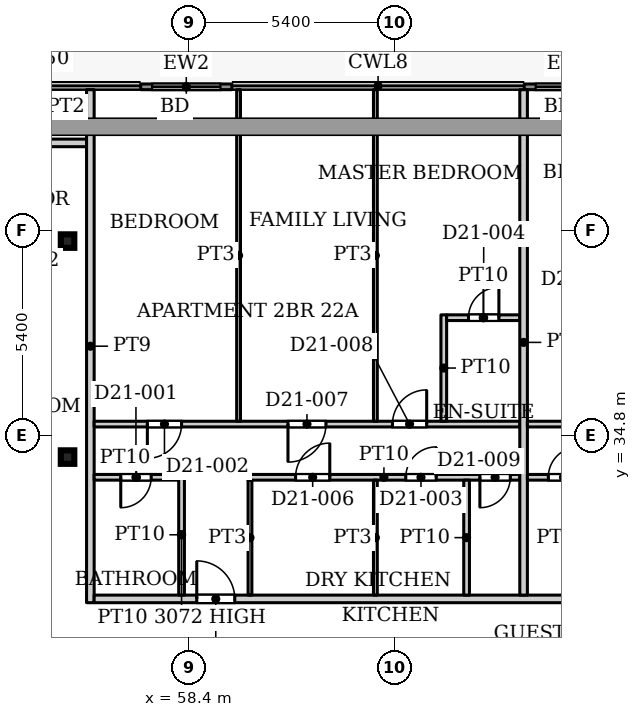
"""IFC4 building model, lengths in metres.
Left out: names, types, materials, properties, quantities, classifications, styles, units other than length and angle.
Written with IfcOpenShell. Run it as: python <this file> out.ifc"""

import sys

from ifc_helpers import new_model, si_unit, direction, frame, frame_2d, origin, origin_2d, place, context, subcontext, project, spatial, rectangle, hollow_rectangle, extrude, source, transform, mapped, element, fill, save


model = new_model("IFC4")
c1 = context("Model", 3, precision=1e-05, world=origin(), true_north=direction((0.0, 1.0)))
c2 = subcontext(c1, "Body", "Model", "MODEL_VIEW")
j1 = project(units=[si_unit("LENGTHUNIT", "METRE"), si_unit("PLANEANGLEUNIT", "RADIAN")], contexts=[c1])
p1 = place(None, origin())
s1 = spatial("IfcSite", under=j1, at=p1, CompositionType="ELEMENT")
p2 = place(p1, origin())
s2 = spatial("IfcBuilding", under=s1, at=p2, CompositionType="ELEMENT")
p3 = place(p2, frame((0.0, 0.0, 98.0)))
s3 = spatial("IfcBuildingStorey", under=s2, at=p3, CompositionType="ELEMENT", Elevation=98.0)
for number, where, z_axis, x_axis in (
    (1, (55.2, 34.232, 0.0), (0.0, 0.0, 1.0), (1.0, 0.0, 0.0)),
    (2, (55.2, 39.916, 0.0), (0.0, 0.0, 1.0), (1.0, 0.0, 0.0)),
):
    element("IfcColumn", number, at=place(p3, frame(where, z_axis=z_axis, x_axis=x_axis)), inside=s3, PredefinedType="COLUMN", context=c2, shape_type="SweptSolid", body=[
        extrude(hollow_rectangle(XDim=0.356, YDim=0.356, WallThickness=0.016, InnerFilletRadius=0.016, OuterFilletRadius=0.032, at=origin_2d()), origin(), (0.0, 0.0, 1.0), 3.9),
    ])
p4 = place(p3, frame((57.124, 43.975, 0.0), z_axis=(0.0, 0.0, 1.0), x_axis=(1.0, 0.0, 0.0)))
e3 = element("IfcWall", 3, at=p4, inside=s3, PredefinedType="SOLIDWALL", context=c2, shape_type="SweptSolid", body=[
    extrude(rectangle(XDim=2.4, YDim=0.15, at=frame_2d((1.2, 0.0))), origin(), (0.0, 0.0, 1.0), 3.75),
])
p5 = place(p4, frame((0.3, 0.0, 0.0)))
e4 = element("IfcOpeningElement", 4, at=p5, cuts=e3, PredefinedType="OPENING", context=c2, shape_type="SweptSolid", body=[
    extrude(rectangle(XDim=1.8, YDim=2.4, at=frame_2d((0.9, 1.2))), frame((0.0, 0.085, 0.0), z_axis=(0.0, -1.0, 0.0), x_axis=(1.0, 0.0, 0.0)), (0.0, 0.0, 1.0), 0.17),
])
p6 = place(p3, frame((67.218, 43.975, 0.0), z_axis=(0.0, 0.0, 1.0), x_axis=(1.0, 0.0, 0.0)))
e5 = element("IfcWall", 5, at=p6, inside=s3, PredefinedType="SOLIDWALL", context=c2, shape_type="SweptSolid", body=[
    extrude(rectangle(XDim=2.4, YDim=0.15, at=frame_2d((1.2, 0.0))), origin(), (0.0, 0.0, 1.0), 3.75),
])
p7 = place(p6, frame((0.3, 0.0, 0.0)))
e6 = element("IfcOpeningElement", 6, at=p7, cuts=e5, PredefinedType="OPENING", context=c2, shape_type="SweptSolid", body=[
    extrude(rectangle(XDim=1.8, YDim=2.4, at=frame_2d((0.9, 1.2))), frame((0.0, 0.085, 0.0), z_axis=(0.0, -1.0, 0.0), x_axis=(1.0, 0.0, 0.0)), (0.0, 0.0, 1.0), 0.17),
])
p8 = place(p3, frame((53.5, 42.5, 0.0), z_axis=(0.0, 0.0, 1.0), x_axis=(1.0, 0.0, 0.0)))
e7 = element("IfcWall", 7, at=p8, inside=s3, PredefinedType="PARTITIONING", context=c2, shape_type="SweptSolid", body=[
    extrude(rectangle(XDim=2.2, YDim=0.2, at=frame_2d((1.1, 0.0))), origin(), (0.0, 0.0, 1.0), 3.6),
])
p9 = place(p8, frame((0.15, 0.0, 0.0)))
e8 = element("IfcOpeningElement", 8, at=p9, cuts=e7, PredefinedType="OPENING", context=c2, shape_type="SweptSolid", body=[
    extrude(rectangle(XDim=1.0, YDim=2.1, at=frame_2d((0.5, 1.05))), frame((0.0, 0.11, 0.0), z_axis=(0.0, -1.0, 0.0), x_axis=(1.0, 0.0, 0.0)), (0.0, 0.0, 1.0), 0.22),
])
p10 = place(p3, frame((55.8, 30.4, 0.0), z_axis=(0.0, 0.0, 1.0), x_axis=(0.0, 1.0, 0.0)))
e9 = element("IfcWall", 9, at=p10, inside=s3, PredefinedType="PARTITIONING", context=c2, shape_type="SweptSolid", body=[
    extrude(rectangle(XDim=13.5, YDim=0.2, at=frame_2d((6.75, 0.0))), origin(), (0.0, 0.0, 1.0), 3.6),
])
p11 = place(p3, frame((55.9, 30.5, 0.0), z_axis=(0.0, 0.0, 1.0), x_axis=(1.0, 0.0, 0.0)))
e10 = element("IfcWall", 10, at=p11, inside=s3, PredefinedType="PARTITIONING", context=c2, shape_type="SweptSolid", body=[
    extrude(rectangle(XDim=42.2, YDim=0.2, at=frame_2d((21.1, 0.0))), origin(), (0.0, 0.0, 1.0), 3.6),
])
p12 = place(p11, frame((2.7, 0.0, 0.0)))
e11 = element("IfcOpeningElement", 11, at=p12, cuts=e10, PredefinedType="OPENING", context=c2, shape_type="SweptSolid", body=[
    extrude(rectangle(XDim=1.0, YDim=2.1, at=frame_2d((0.5, 1.05))), frame((0.0, 0.11, 0.0), z_axis=(0.0, -1.0, 0.0), x_axis=(1.0, 0.0, 0.0)), (0.0, 0.0, 1.0), 0.22),
])
p13 = place(p11, frame((15.3, 0.0, 0.0)))
e12 = element("IfcOpeningElement", 12, at=p13, cuts=e10, PredefinedType="OPENING", context=c2, shape_type="SweptSolid", body=[
    extrude(rectangle(XDim=1.0, YDim=2.1, at=frame_2d((0.5, 1.05))), frame((0.0, 0.11, 0.0), z_axis=(0.0, -1.0, 0.0), x_axis=(1.0, 0.0, 0.0)), (0.0, 0.0, 1.0), 0.22),
])
p14 = place(p11, frame((33.3, 0.0, 0.0)))
e13 = element("IfcOpeningElement", 13, at=p14, cuts=e10, PredefinedType="OPENING", context=c2, shape_type="SweptSolid", body=[
    extrude(rectangle(XDim=1.0, YDim=2.1, at=frame_2d((0.5, 1.05))), frame((0.0, 0.11, 0.0), z_axis=(0.0, -1.0, 0.0), x_axis=(1.0, 0.0, 0.0)), (0.0, 0.0, 1.0), 0.22),
])
p15 = place(p3, frame((55.9, 33.7, 0.0), z_axis=(0.0, 0.0, 1.0), x_axis=(1.0, 0.0, 0.0)))
e14 = element("IfcWall", 14, at=p15, inside=s3, PredefinedType="PARTITIONING", context=c2, shape_type="SweptSolid", body=[
    extrude(rectangle(XDim=2.225, YDim=0.15, at=frame_2d((1.113, 0.0))), origin(), (0.0, 0.0, 1.0), 3.6),
])
p16 = place(p15, frame((0.7, 0.0, 0.0)))
e15 = element("IfcOpeningElement", 15, at=p16, cuts=e14, PredefinedType="OPENING", context=c2, shape_type="SweptSolid", body=[
    extrude(rectangle(XDim=0.8, YDim=2.1, at=frame_2d((0.4, 1.05))), frame((0.0, 0.085, 0.0), z_axis=(0.0, -1.0, 0.0), x_axis=(1.0, 0.0, 0.0)), (0.0, 0.0, 1.0), 0.17),
])
p17 = place(p3, frame((55.9, 35.1, 0.0), z_axis=(0.0, 0.0, 1.0), x_axis=(1.0, 0.0, 0.0)))
e16 = element("IfcWall", 16, at=p17, inside=s3, PredefinedType="PARTITIONING", context=c2, shape_type="SweptSolid", body=[
    extrude(rectangle(XDim=11.2, YDim=0.15, at=frame_2d((5.6, 0.0))), origin(), (0.0, 0.0, 1.0), 3.6),
])
p18 = place(p17, frame((1.4, 0.0, 0.0)))
e17 = element("IfcOpeningElement", 17, at=p18, cuts=e16, PredefinedType="OPENING", context=c2, shape_type="SweptSolid", body=[
    extrude(rectangle(XDim=0.9, YDim=2.1, at=frame_2d((0.45, 1.05))), frame((0.0, 0.085, 0.0), z_axis=(0.0, -1.0, 0.0), x_axis=(1.0, 0.0, 0.0)), (0.0, 0.0, 1.0), 0.17),
])
p19 = place(p17, frame((5.1, 0.0, 0.0)))
e18 = element("IfcOpeningElement", 18, at=p19, cuts=e16, PredefinedType="OPENING", context=c2, shape_type="SweptSolid", body=[
    extrude(rectangle(XDim=1.0, YDim=2.1, at=frame_2d((0.5, 1.05))), frame((0.0, 0.085, 0.0), z_axis=(0.0, -1.0, 0.0), x_axis=(1.0, 0.0, 0.0)), (0.0, 0.0, 1.0), 0.17),
])
p20 = place(p17, frame((7.85, 0.0, 0.0)))
e19 = element("IfcOpeningElement", 19, at=p20, cuts=e16, PredefinedType="OPENING", context=c2, shape_type="SweptSolid", body=[
    extrude(rectangle(XDim=0.9, YDim=2.1, at=frame_2d((0.45, 1.05))), frame((0.0, 0.085, 0.0), z_axis=(0.0, -1.0, 0.0), x_axis=(1.0, 0.0, 0.0)), (0.0, 0.0, 1.0), 0.17),
])
p21 = place(p3, frame((58.2, 30.6, 0.0), z_axis=(0.0, 0.0, 1.0), x_axis=(0.0, 1.0, 0.0)))
e20 = element("IfcWall", 20, at=p21, inside=s3, PredefinedType="PARTITIONING", context=c2, shape_type="SweptSolid", body=[
    extrude(rectangle(XDim=3.175, YDim=0.15, at=frame_2d((1.587, 0.0))), origin(), (0.0, 0.0, 1.0), 3.072),
])
p22 = place(p3, frame((59.7, 35.175, 0.0), z_axis=(0.0, 0.0, 1.0), x_axis=(0.0, 1.0, 0.0)))
e21 = element("IfcWall", 21, at=p22, inside=s3, PredefinedType="PARTITIONING", context=c2, shape_type="SweptSolid", body=[
    extrude(rectangle(XDim=8.725, YDim=0.1, at=frame_2d((4.362, 0.0))), origin(), (0.0, 0.0, 1.0), 3.6),
])
p23 = place(p3, frame((59.95, 33.7, 0.0), z_axis=(0.0, 0.0, 1.0), x_axis=(1.0, 0.0, 0.0)))
e22 = element("IfcWall", 22, at=p23, inside=s3, PredefinedType="PARTITIONING", context=c2, shape_type="SweptSolid", body=[
    extrude(rectangle(XDim=7.15, YDim=0.15, at=frame_2d((3.575, 0.0))), origin(), (0.0, 0.0, 1.0), 3.6),
])
p24 = place(p23, frame((4.15, 0.0, 0.0)))
e23 = element("IfcOpeningElement", 23, at=p24, cuts=e22, PredefinedType="OPENING", context=c2, shape_type="SweptSolid", body=[
    extrude(rectangle(XDim=0.8, YDim=2.1, at=frame_2d((0.4, 1.05))), frame((0.0, 0.085, 0.0), z_axis=(0.0, -1.0, 0.0), x_axis=(1.0, 0.0, 0.0)), (0.0, 0.0, 1.0), 0.17),
])
p25 = place(p23, frame((1.25, 0.0, 0.0)))
e24 = element("IfcOpeningElement", 24, at=p25, cuts=e22, PredefinedType="OPENING", context=c2, shape_type="SweptSolid", body=[
    extrude(rectangle(XDim=0.9, YDim=2.1, at=frame_2d((0.45, 1.05))), frame((0.0, 0.085, 0.0), z_axis=(0.0, -1.0, 0.0), x_axis=(1.0, 0.0, 0.0)), (0.0, 0.0, 1.0), 0.17),
])
p26 = place(p23, frame((6.1, 0.0, 0.0)))
e25 = element("IfcOpeningElement", 25, at=p26, cuts=e22, PredefinedType="OPENING", context=c2, shape_type="SweptSolid", body=[
    extrude(rectangle(XDim=0.8, YDim=2.1, at=frame_2d((0.4, 1.05))), frame((0.0, 0.085, 0.0), z_axis=(0.0, -1.0, 0.0), x_axis=(1.0, 0.0, 0.0)), (0.0, 0.0, 1.0), 0.17),
])
for number, where, z_axis, x_axis in (
    (26, (60.0, 30.6, 0.0), (0.0, 0.0, 1.0), (0.0, 1.0, 0.0)),
    (27, (63.3, 30.6, 0.0), (0.0, 0.0, 1.0), (0.0, 1.0, 0.0)),
):
    element("IfcWall", number, at=place(p3, frame(where, z_axis=z_axis, x_axis=x_axis)), inside=s3, PredefinedType="PARTITIONING", context=c2, shape_type="SweptSolid", body=[
        extrude(rectangle(XDim=3.025, YDim=0.1, at=frame_2d((1.512, 0.0))), origin(), (0.0, 0.0, 1.0), 3.6),
    ])
p27 = place(p3, frame((63.3, 35.175, 0.0), z_axis=(0.0, 0.0, 1.0), x_axis=(0.0, 1.0, 0.0)))
e28 = element("IfcWall", 28, at=p27, inside=s3, PredefinedType="PARTITIONING", context=c2, shape_type="SweptSolid", body=[
    extrude(rectangle(XDim=8.725, YDim=0.1, at=frame_2d((4.362, 0.0))), origin(), (0.0, 0.0, 1.0), 3.6),
])
p28 = place(p3, frame((65.1, 35.175, 0.0), z_axis=(0.0, 0.0, 1.0), x_axis=(0.0, 1.0, 0.0)))
e29 = element("IfcWall", 29, at=p28, inside=s3, PredefinedType="PARTITIONING", context=c2, shape_type="SweptSolid", body=[
    extrude(rectangle(XDim=2.8, YDim=0.15, at=frame_2d((1.4, 0.0))), origin(), (0.0, 0.0, 1.0), 3.6),
])
p29 = place(p3, frame((65.175, 37.9, 0.0), z_axis=(0.0, 0.0, 1.0), x_axis=(1.0, 0.0, 0.0)))
e30 = element("IfcWall", 30, at=p29, inside=s3, PredefinedType="PARTITIONING", context=c2, shape_type="SweptSolid", body=[
    extrude(rectangle(XDim=1.925, YDim=0.15, at=frame_2d((0.962, 0.0))), origin(), (0.0, 0.0, 1.0), 3.6),
])
p30 = place(p29, frame((0.575, 0.0, 0.0)))
e31 = element("IfcOpeningElement", 31, at=p30, cuts=e30, PredefinedType="OPENING", context=c2, shape_type="SweptSolid", body=[
    extrude(rectangle(XDim=0.8, YDim=2.1, at=frame_2d((0.4, 1.05))), frame((0.0, 0.085, 0.0), z_axis=(0.0, -1.0, 0.0), x_axis=(1.0, 0.0, 0.0)), (0.0, 0.0, 1.0), 0.17),
])
p31 = place(p3, frame((65.7, 30.6, 0.0), z_axis=(0.0, 0.0, 1.0), x_axis=(0.0, 1.0, 0.0)))
e32 = element("IfcWall", 32, at=p31, inside=s3, PredefinedType="PARTITIONING", context=c2, shape_type="SweptSolid", body=[
    extrude(rectangle(XDim=3.025, YDim=0.15, at=frame_2d((1.512, 0.0))), origin(), (0.0, 0.0, 1.0), 3.6),
])
p32 = place(p3, frame((67.2, 30.6, 0.0), z_axis=(0.0, 0.0, 1.0), x_axis=(0.0, 1.0, 0.0)))
e33 = element("IfcWall", 33, at=p32, inside=s3, PredefinedType="PARTITIONING", context=c2, shape_type="SweptSolid", body=[
    extrude(rectangle(XDim=13.3, YDim=0.2, at=frame_2d((6.65, 0.0))), origin(), (0.0, 0.0, 1.0), 3.6),
])
p33 = place(p3, frame((67.3, 33.7, 0.0), z_axis=(0.0, 0.0, 1.0), x_axis=(1.0, 0.0, 0.0)))
e34 = element("IfcWall", 34, at=p33, inside=s3, PredefinedType="PARTITIONING", context=c2, shape_type="SweptSolid", body=[
    extrude(rectangle(XDim=3.55, YDim=0.15, at=frame_2d((1.775, 0.0))), origin(), (0.0, 0.0, 1.0), 3.6),
])
p34 = place(p33, frame((0.55, 0.0, 0.0)))
e35 = element("IfcOpeningElement", 35, at=p34, cuts=e34, PredefinedType="OPENING", context=c2, shape_type="SweptSolid", body=[
    extrude(rectangle(XDim=0.8, YDim=2.1, at=frame_2d((0.4, 1.05))), frame((0.0, 0.085, 0.0), z_axis=(0.0, -1.0, 0.0), x_axis=(1.0, 0.0, 0.0)), (0.0, 0.0, 1.0), 0.17),
])
p35 = place(p33, frame((2.35, 0.0, 0.0)))
e36 = element("IfcOpeningElement", 36, at=p35, cuts=e34, PredefinedType="OPENING", context=c2, shape_type="SweptSolid", body=[
    extrude(rectangle(XDim=0.8, YDim=2.1, at=frame_2d((0.4, 1.05))), frame((0.0, 0.085, 0.0), z_axis=(0.0, -1.0, 0.0), x_axis=(1.0, 0.0, 0.0)), (0.0, 0.0, 1.0), 0.17),
])
p36 = place(p3, frame((67.3, 35.1, 0.0), z_axis=(0.0, 0.0, 1.0), x_axis=(1.0, 0.0, 0.0)))
e37 = element("IfcWall", 37, at=p36, inside=s3, PredefinedType="PARTITIONING", context=c2, shape_type="SweptSolid", body=[
    extrude(rectangle(XDim=9.7, YDim=0.15, at=frame_2d((4.85, 0.0))), origin(), (0.0, 0.0, 1.0), 3.6),
])
p37 = place(p36, frame((1.0, 0.0, 0.0)))
e38 = element("IfcOpeningElement", 38, at=p37, cuts=e37, PredefinedType="OPENING", context=c2, shape_type="SweptSolid", body=[
    extrude(rectangle(XDim=0.9, YDim=2.1, at=frame_2d((0.45, 1.05))), frame((0.0, 0.085, 0.0), z_axis=(0.0, -1.0, 0.0), x_axis=(1.0, 0.0, 0.0)), (0.0, 0.0, 1.0), 0.17),
])
p38 = place(p36, frame((6.3, 0.0, 0.0)))
e39 = element("IfcOpeningElement", 39, at=p38, cuts=e37, PredefinedType="OPENING", context=c2, shape_type="SweptSolid", body=[
    extrude(rectangle(XDim=1.0, YDim=2.1, at=frame_2d((0.5, 1.05))), frame((0.0, 0.085, 0.0), z_axis=(0.0, -1.0, 0.0), x_axis=(1.0, 0.0, 0.0)), (0.0, 0.0, 1.0), 0.17),
])
m1 = source(origin(), c2, "Body", "SweptSolid", [
    extrude(rectangle(XDim=1.8, YDim=2.4, at=frame_2d((0.9, 1.2))), frame((0.0, 0.025, 0.0), z_axis=(0.0, -1.0, 0.0), x_axis=(1.0, 0.0, 0.0)), (0.0, 0.0, 1.0), 0.05),
])
p39 = place(p5, origin())
e40 = element("IfcDoor", 40, at=p39, inside=s3, OperationType="SLIDING_TO_LEFT", PredefinedType="DOOR", context=c2, shape_type="MappedRepresentation", body=[
    mapped(m1, transform((0.0, 0.0, 0.0), x_axis=(1.0, 0.0, 0.0), y_axis=(0.0, 1.0, 0.0), z_axis=(0.0, 0.0, 1.0), scale=1.0)),
])
fill(e4, e40)
p40 = place(p7, origin())
e41 = element("IfcDoor", 41, at=p40, inside=s3, OperationType="SLIDING_TO_LEFT", PredefinedType="DOOR", context=c2, shape_type="MappedRepresentation", body=[
    mapped(m1, transform((0.0, 0.0, 0.0), x_axis=(1.0, 0.0, 0.0), y_axis=(0.0, 1.0, 0.0), z_axis=(0.0, 0.0, 1.0), scale=1.0)),
])
fill(e6, e41)
m2 = source(origin(), c2, "Body", "SweptSolid", [
    extrude(rectangle(XDim=0.8, YDim=2.1, at=frame_2d((0.4, 1.05))), frame((0.0, 0.025, 0.0), z_axis=(0.0, -1.0, 0.0), x_axis=(1.0, 0.0, 0.0)), (0.0, 0.0, 1.0), 0.05),
])
p41 = place(p16, origin())
e42 = element("IfcDoor", 42, at=p41, inside=s3, OperationType="SINGLE_SWING_RIGHT", PredefinedType="DOOR", context=c2, shape_type="MappedRepresentation", body=[
    mapped(m2, transform((0.0, 0.0, 0.0), x_axis=(1.0, 0.0, 0.0), y_axis=(0.0, 1.0, 0.0), z_axis=(0.0, 0.0, 1.0), scale=1.0)),
])
fill(e15, e42)
m3 = source(origin(), c2, "Body", "SweptSolid", [
    extrude(rectangle(XDim=0.9, YDim=2.1, at=frame_2d((0.45, 1.05))), frame((0.0, 0.025, 0.0), z_axis=(0.0, -1.0, 0.0), x_axis=(1.0, 0.0, 0.0)), (0.0, 0.0, 1.0), 0.05),
])
p42 = place(p18, origin())
e43 = element("IfcDoor", 43, at=p42, inside=s3, OperationType="SINGLE_SWING_RIGHT", PredefinedType="DOOR", context=c2, shape_type="MappedRepresentation", body=[
    mapped(m3, transform((0.0, 0.0, 0.0), x_axis=(1.0, 0.0, 0.0), y_axis=(0.0, 1.0, 0.0), z_axis=(0.0, 0.0, 1.0), scale=1.0)),
])
fill(e17, e43)
p43 = place(p24, origin())
e44 = element("IfcDoor", 44, at=p43, inside=s3, OperationType="SINGLE_SWING_LEFT", PredefinedType="DOOR", context=c2, shape_type="MappedRepresentation", body=[
    mapped(m2, transform((0.0, 0.0, 0.0), x_axis=(1.0, 0.0, 0.0), y_axis=(0.0, 1.0, 0.0), z_axis=(0.0, 0.0, 1.0), scale=1.0)),
])
fill(e23, e44)
p44 = place(p30, origin())
e45 = element("IfcDoor", 45, at=p44, inside=s3, OperationType="SINGLE_SWING_LEFT", PredefinedType="DOOR", context=c2, shape_type="MappedRepresentation", body=[
    mapped(m2, transform((0.0, 0.0, 0.0), x_axis=(1.0, 0.0, 0.0), y_axis=(0.0, 1.0, 0.0), z_axis=(0.0, 0.0, 1.0), scale=1.0)),
])
fill(e31, e45)
m4 = source(origin(), c2, "Body", "SweptSolid", [
    extrude(rectangle(XDim=1.0, YDim=2.1, at=frame_2d((0.5, 1.05))), frame((0.0, 0.025, 0.0), z_axis=(0.0, -1.0, 0.0), x_axis=(1.0, 0.0, 0.0)), (0.0, 0.0, 1.0), 0.05),
])
p45 = place(p12, origin())
e46 = element("IfcDoor", 46, at=p45, inside=s3, OperationType="SINGLE_SWING_LEFT", PredefinedType="DOOR", context=c2, shape_type="MappedRepresentation", body=[
    mapped(m4, transform((0.0, 0.0, 0.0), x_axis=(1.0, 0.0, 0.0), y_axis=(0.0, 1.0, 0.0), z_axis=(0.0, 0.0, 1.0), scale=1.0)),
])
fill(e11, e46)
p46 = place(p25, origin())
e47 = element("IfcDoor", 47, at=p46, inside=s3, OperationType="SINGLE_SWING_LEFT", PredefinedType="DOOR", context=c2, shape_type="MappedRepresentation", body=[
    mapped(m3, transform((0.0, 0.0, 0.0), x_axis=(1.0, 0.0, 0.0), y_axis=(0.0, 1.0, 0.0), z_axis=(0.0, 0.0, 1.0), scale=1.0)),
])
fill(e24, e47)
m5 = source(origin(), c2, "Body", "SweptSolid", [
    extrude(rectangle(XDim=1.0, YDim=2.1, at=frame_2d((0.5, 1.05))), frame((0.0, 0.025, 0.0), z_axis=(0.0, -1.0, 0.0), x_axis=(1.0, 0.0, 0.0)), (0.0, 0.0, 1.0), 0.05),
])
p47 = place(p19, origin())
e48 = element("IfcDoor", 48, at=p47, inside=s3, OperationType="SINGLE_SWING_RIGHT", PredefinedType="DOOR", context=c2, shape_type="MappedRepresentation", body=[
    mapped(m5, transform((0.0, 0.0, 0.0), x_axis=(1.0, 0.0, 0.0), y_axis=(0.0, 1.0, 0.0), z_axis=(0.0, 0.0, 1.0), scale=1.0)),
])
fill(e18, e48)
p48 = place(p20, origin())
e49 = element("IfcDoor", 49, at=p48, inside=s3, OperationType="SINGLE_SWING_LEFT", PredefinedType="DOOR", context=c2, shape_type="MappedRepresentation", body=[
    mapped(m3, transform((0.0, 0.0, 0.0), x_axis=(1.0, 0.0, 0.0), y_axis=(0.0, 1.0, 0.0), z_axis=(0.0, 0.0, 1.0), scale=1.0)),
])
fill(e19, e49)
p49 = place(p26, origin())
e50 = element("IfcDoor", 50, at=p49, inside=s3, OperationType="SINGLE_SWING_RIGHT", PredefinedType="DOOR", context=c2, shape_type="MappedRepresentation", body=[
    mapped(m2, transform((0.0, 0.0, 0.0), x_axis=(1.0, 0.0, 0.0), y_axis=(0.0, 1.0, 0.0), z_axis=(0.0, 0.0, 1.0), scale=1.0)),
])
fill(e25, e50)
p50 = place(p34, origin())
e51 = element("IfcDoor", 51, at=p50, inside=s3, OperationType="SINGLE_SWING_LEFT", PredefinedType="DOOR", context=c2, shape_type="MappedRepresentation", body=[
    mapped(m2, transform((0.0, 0.0, 0.0), x_axis=(1.0, 0.0, 0.0), y_axis=(0.0, 1.0, 0.0), z_axis=(0.0, 0.0, 1.0), scale=1.0)),
])
fill(e35, e51)
save(model, sys.argv[1])
